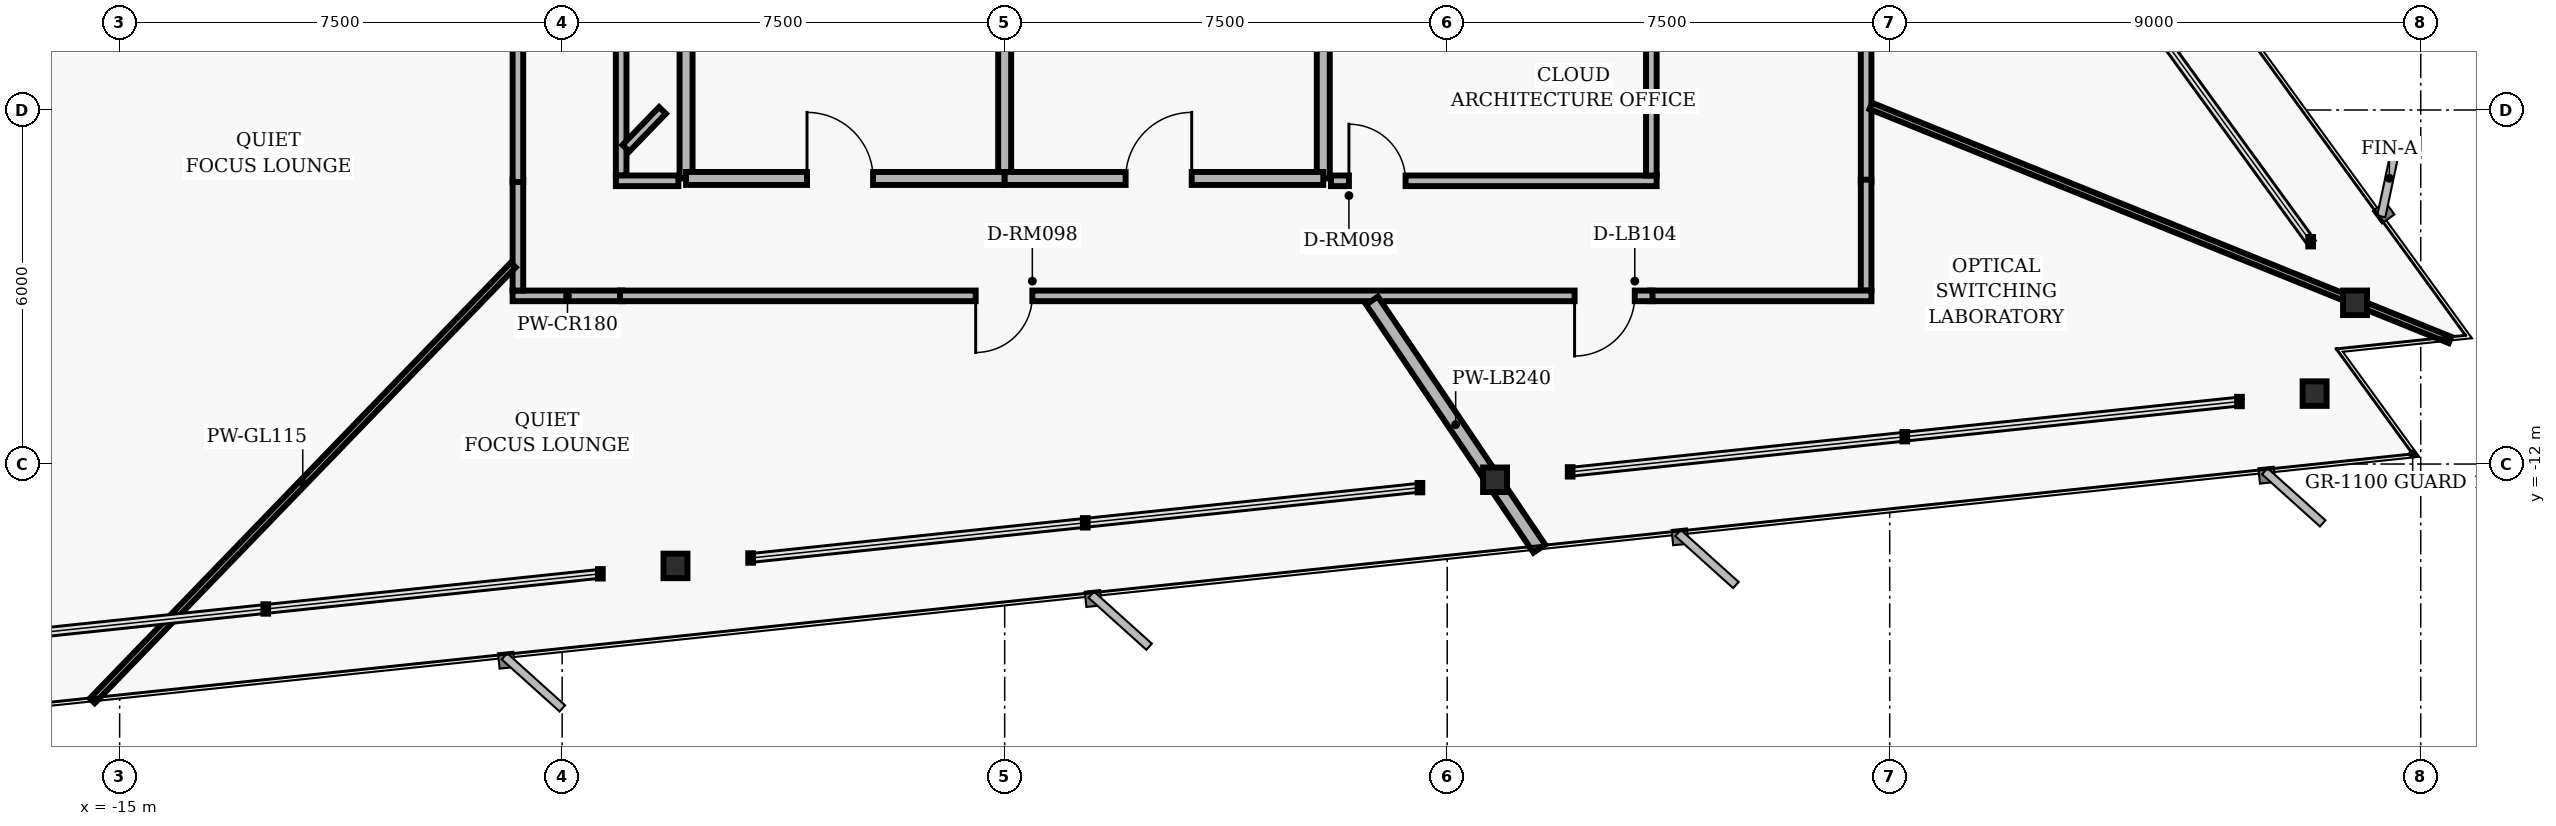
"""IFC4 building model, lengths in metres.
Left out: names, types, materials, properties, quantities, classifications, styles, units other than length and angle.
Written with IfcOpenShell. Run it as: python <this file> out.ifc"""

import sys

from ifc_helpers import new_model, si_unit, direction, frame, frame_2d, origin, origin_2d, place, context, subcontext, project, spatial, rectangle, i_section, extrude, element, fill, save


model = new_model("IFC4")
c1 = context("Model", 3, precision=1e-05, world=origin(), true_north=direction((0.0, 1.0)))
c2 = subcontext(c1, "Body", "Model", "MODEL_VIEW")
j1 = project(units=[si_unit("LENGTHUNIT", "METRE"), si_unit("PLANEANGLEUNIT", "RADIAN")], contexts=[c1])
p1 = place(None, origin())
s1 = spatial("IfcSite", under=j1, at=p1, CompositionType="ELEMENT")
p2 = place(p1, origin())
s2 = spatial("IfcBuilding", under=s1, at=p2, CompositionType="ELEMENT")
p3 = place(p2, frame((0.0, 0.0, 122.88)))
s3 = spatial("IfcBuildingStorey", under=s2, at=p3, CompositionType="ELEMENT", Elevation=122.88)
for number, where, z_axis, x_axis in (
    (1, (22.887, -9.268, 0.0), (0.0, 0.0, 1.0), (1.0, 0.0, 0.0)),
    (2, (-5.579, -13.727, 0.0), (0.0, 0.0, 1.0), (1.0, 0.0, 0.0)),
    (3, (8.311, -12.267, 0.0), (0.0, 0.0, 1.0), (1.0, 0.0, 0.0)),
    (4, (22.201, -10.807, 0.0), (0.0, 0.0, 1.0), (1.0, 0.0, 0.0)),
):
    element("IfcColumn", number, at=place(p3, frame(where, z_axis=z_axis, x_axis=x_axis)), inside=s3, PredefinedType="COLUMN", context=c2, shape_type="SweptSolid", body=[
        extrude(i_section(OverallWidth=0.406, OverallDepth=0.416, WebThickness=0.03, FlangeThickness=0.048, FilletRadius=0.02, at=origin_2d()), origin(), (0.0, 0.0, 1.0), 3.04),
    ])
for number, where, z_axis, x_axis in (
    (5, (-5.4, -7.16, 0.0), (0.0, 0.0, 1.0), (0.0, 1.0, 0.0)),
    (6, (5.4, -7.16, 0.0), (0.0, 0.0, 1.0), (0.0, 1.0, 0.0)),
):
    element("IfcWall", number, at=place(p3, frame(where, z_axis=z_axis, x_axis=x_axis)), inside=s3, PredefinedType="PARTITIONING", context=c2, shape_type="SweptSolid", body=[
        extrude(rectangle(XDim=2.71, YDim=0.22, at=frame_2d((1.355, 0.0))), origin(), (0.0, 0.0, 1.0), 2.593),
    ])
p4 = place(p3, frame((0.0, -7.16, 0.0), z_axis=(0.0, 0.0, 1.0), x_axis=(0.0, 1.0, 0.0)))
e7 = element("IfcWall", 7, at=p4, inside=s3, PredefinedType="PARTITIONING", context=c2, shape_type="SweptSolid", body=[
    extrude(rectangle(XDim=2.81, YDim=0.22, at=frame_2d((1.405, 0.0))), origin(), (0.0, 0.0, 1.0), 2.593),
])
p5 = place(p3, frame((-5.4, -7.16, 0.0), z_axis=(0.0, 0.0, 1.0), x_axis=(1.0, 0.0, 0.0)))
e8 = element("IfcWall", 8, at=p5, inside=s3, PredefinedType="PARTITIONING", context=c2, shape_type="SweptSolid", body=[
    extrude(rectangle(XDim=5.4, YDim=0.22, at=frame_2d((2.7, 0.0))), origin(), (0.0, 0.0, 1.0), 2.16),
])
p6 = place(p5, frame((2.05, 0.0, 0.0)))
e9 = element("IfcOpeningElement", 9, at=p6, cuts=e8, PredefinedType="OPENING", context=c2, shape_type="SweptSolid", body=[
    extrude(rectangle(XDim=1.12, YDim=2.02, at=frame_2d((0.56, 1.01))), frame((0.0, 0.12, 0.0), z_axis=(0.0, -1.0, 0.0), x_axis=(1.0, 0.0, 0.0)), (0.0, 0.0, 1.0), 0.24),
])
p7 = place(p3, frame((0.0, -7.16, 0.0), z_axis=(0.0, 0.0, 1.0), x_axis=(1.0, 0.0, 0.0)))
e10 = element("IfcWall", 10, at=p7, inside=s3, PredefinedType="PARTITIONING", context=c2, shape_type="SweptSolid", body=[
    extrude(rectangle(XDim=5.4, YDim=0.22, at=frame_2d((2.7, 0.0))), origin(), (0.0, 0.0, 1.0), 2.16),
])
p8 = place(p7, frame((2.05, 0.0, 0.0)))
e11 = element("IfcOpeningElement", 11, at=p8, cuts=e10, PredefinedType="OPENING", context=c2, shape_type="SweptSolid", body=[
    extrude(rectangle(XDim=1.12, YDim=2.02, at=frame_2d((0.56, 1.01))), frame((0.0, 0.12, 0.0), z_axis=(0.0, -1.0, 0.0), x_axis=(1.0, 0.0, 0.0)), (0.0, 0.0, 1.0), 0.24),
])
p9 = place(p3, frame((-6.48, -9.15, 0.0), z_axis=(0.0, 0.0, 1.0), x_axis=(-1.0, 0.0, 0.0)))
e12 = element("IfcWall", 12, at=p9, inside=s3, PredefinedType="PARTITIONING", context=c2, shape_type="SweptSolid", body=[
    extrude(rectangle(XDim=1.86, YDim=0.18, at=frame_2d((0.93, 0.0))), origin(), (0.0, 0.0, 1.0), 2.16),
])
p10 = place(p3, frame((-8.25, -9.06, 0.0), z_axis=(0.0, 0.0, 1.0), x_axis=(0.0, 1.0, 0.0)))
e13 = element("IfcWall", 13, at=p10, inside=s3, PredefinedType="PARTITIONING", context=c2, shape_type="SweptSolid", body=[
    extrude(rectangle(XDim=1.88, YDim=0.18, at=frame_2d((0.94, 0.0))), origin(), (0.0, 0.0, 1.0), 2.593),
])
p11 = place(p3, frame((-8.25, -7.22, 0.0), z_axis=(0.0, 0.0, 1.0), x_axis=(0.0, 1.0, 0.0)))
e14 = element("IfcWall", 14, at=p11, inside=s3, PredefinedType="PARTITIONING", context=c2, shape_type="SweptSolid", body=[
    extrude(rectangle(XDim=14.44, YDim=0.18, at=frame_2d((7.22, 0.0))), origin(), (0.0, 0.0, 1.0), 2.16),
])
p12 = place(p11, frame((4.775, 0.0, 0.0)))
e15 = element("IfcOpeningElement", 15, at=p12, cuts=e14, PredefinedType="OPENING", context=c2, shape_type="SweptSolid", body=[
    extrude(rectangle(XDim=0.96, YDim=2.02, at=frame_2d((0.48, 1.01))), frame((0.0, 0.1, 0.0), z_axis=(0.0, -1.0, 0.0), x_axis=(1.0, 0.0, 0.0)), (0.0, 0.0, 1.0), 0.2),
])
p13 = place(p3, frame((14.6, 3.018, 0.0), z_axis=(0.0, 0.0, 1.0), x_axis=(0.0, -1.0, 0.0)))
e16 = element("IfcWall", 16, at=p13, inside=s3, PredefinedType="PARTITIONING", context=c2, shape_type="SweptSolid", body=[
    extrude(rectangle(XDim=10.238, YDim=0.18, at=frame_2d((5.119, 0.0))), origin(), (0.0, 0.0, 1.0), 2.593),
])
p14 = place(p13, frame((4.124, 0.0, 0.0)))
e17 = element("IfcOpeningElement", 17, at=p14, cuts=e16, PredefinedType="OPENING", context=c2, shape_type="SweptSolid", body=[
    extrude(rectangle(XDim=0.96, YDim=2.02, at=frame_2d((0.48, 1.01))), frame((0.0, 0.1, 0.0), z_axis=(0.0, -1.0, 0.0), x_axis=(1.0, 0.0, 0.0)), (0.0, 0.0, 1.0), 0.2),
])
p15 = place(p3, frame((14.6, -7.18, 0.0), z_axis=(0.0, 0.0, 1.0), x_axis=(0.0, -1.0, 0.0)))
e18 = element("IfcWall", 18, at=p15, inside=s3, PredefinedType="PARTITIONING", context=c2, shape_type="SweptSolid", body=[
    extrude(rectangle(XDim=1.88, YDim=0.18, at=frame_2d((0.94, 0.0))), origin(), (0.0, 0.0, 1.0), 2.593),
])
p16 = place(p3, frame((14.69, -9.15, 0.0), z_axis=(0.0, 0.0, 1.0), x_axis=(-1.0, 0.0, 0.0)))
e19 = element("IfcWall", 19, at=p16, inside=s3, PredefinedType="PARTITIONING", context=c2, shape_type="SweptSolid", body=[
    extrude(rectangle(XDim=3.75, YDim=0.18, at=frame_2d((1.875, 0.0))), origin(), (0.0, 0.0, 1.0), 2.16),
])
p17 = place(p3, frame((10.98, -9.15, 0.0), z_axis=(0.0, 0.0, 1.0), x_axis=(-1.0, 0.0, 0.0)))
e20 = element("IfcWall", 20, at=p17, inside=s3, PredefinedType="PARTITIONING", context=c2, shape_type="SweptSolid", body=[
    extrude(rectangle(XDim=17.5, YDim=0.18, at=frame_2d((8.75, 0.0))), origin(), (0.0, 0.0, 1.0), 2.16),
])
p18 = place(p17, frame((10.511, 0.0, 0.0)))
e21 = element("IfcOpeningElement", 21, at=p18, cuts=e20, PredefinedType="OPENING", context=c2, shape_type="SweptSolid", body=[
    extrude(rectangle(XDim=0.96, YDim=2.02, at=frame_2d((0.48, 1.01))), frame((0.0, 0.1, 0.0), z_axis=(0.0, -1.0, 0.0), x_axis=(1.0, 0.0, 0.0)), (0.0, 0.0, 1.0), 0.2),
])
p19 = place(p17, frame((0.301, 0.0, 0.0)))
e22 = element("IfcOpeningElement", 22, at=p19, cuts=e20, PredefinedType="OPENING", context=c2, shape_type="SweptSolid", body=[
    extrude(rectangle(XDim=1.02, YDim=2.02, at=frame_2d((0.51, 1.01))), frame((0.0, 0.1, 0.0), z_axis=(0.0, -1.0, 0.0), x_axis=(1.0, 0.0, 0.0)), (0.0, 0.0, 1.0), 0.2),
])
p20 = place(p3, frame((5.53, -7.2, 0.0), z_axis=(0.0, 0.0, 1.0), x_axis=(1.0, 0.0, 0.0)))
e23 = element("IfcWall", 23, at=p20, inside=s3, PredefinedType="PARTITIONING", context=c2, shape_type="SweptSolid", body=[
    extrude(rectangle(XDim=5.52, YDim=0.18, at=frame_2d((2.76, 0.0))), origin(), (0.0, 0.0, 1.0), 2.16),
])
p21 = place(p20, frame((0.305, 0.0, 0.0)))
e24 = element("IfcOpeningElement", 24, at=p21, cuts=e23, PredefinedType="OPENING", context=c2, shape_type="SweptSolid", body=[
    extrude(rectangle(XDim=0.96, YDim=2.02, at=frame_2d((0.48, 1.01))), frame((0.0, 0.1, 0.0), z_axis=(0.0, -1.0, 0.0), x_axis=(1.0, 0.0, 0.0)), (0.0, 0.0, 1.0), 0.2),
])
p22 = place(p3, frame((10.96, -7.11, 0.0), z_axis=(0.0, 0.0, 1.0), x_axis=(0.0, 1.0, 0.0)))
e25 = element("IfcWall", 25, at=p22, inside=s3, PredefinedType="PARTITIONING", context=c2, shape_type="SweptSolid", body=[
    extrude(rectangle(XDim=3.271, YDim=0.18, at=frame_2d((1.635, 0.0))), origin(), (0.0, 0.0, 1.0), 2.593),
])
p23 = place(p3, frame((-6.5, -4.88, 0.0), z_axis=(0.0, 0.0, 1.0), x_axis=(0.0, -1.0, 0.0)))
e26 = element("IfcWall", 26, at=p23, inside=s3, PredefinedType="PARTITIONING", context=c2, shape_type="SweptSolid", body=[
    extrude(rectangle(XDim=2.23, YDim=0.18, at=frame_2d((1.115, 0.0))), origin(), (0.0, 0.0, 1.0), 2.593),
])
p24 = place(p3, frame((-6.59, -7.2, 0.0), z_axis=(0.0, 0.0, 1.0), x_axis=(1.0, 0.0, 0.0)))
e27 = element("IfcWall", 27, at=p24, inside=s3, PredefinedType="PARTITIONING", context=c2, shape_type="SweptSolid", body=[
    extrude(rectangle(XDim=1.06, YDim=0.18, at=frame_2d((0.53, 0.0))), origin(), (0.0, 0.0, 1.0), 2.16),
])
p25 = place(p3, frame((-5.8, -6.006, 0.0), z_axis=(0.0, 0.0, 1.0), x_axis=(-0.694550575615, -0.719443881003, 0.0)))
e28 = element("IfcWall", 28, at=p25, inside=s3, PredefinedType="PARTITIONING", context=c2, shape_type="SweptSolid", body=[
    extrude(rectangle(XDim=0.893, YDim=0.16, at=frame_2d((0.446, 0.0))), origin(), (0.0, 0.0, 1.0), 2.593),
])
p26 = place(p3, frame((-8.33, -8.626, 0.0), z_axis=(0.0, 0.0, 1.0), x_axis=(-0.694659007852, -0.719339184815, 0.0)))
e29 = element("IfcWall", 29, at=p26, inside=s3, PredefinedType="MOVABLE", context=c2, shape_type="SweptSolid", body=[
    extrude(rectangle(XDim=10.268, YDim=0.115, at=frame_2d((5.134, 0.0))), origin(), (0.0, 0.0, 1.0), 2.593),
])
p27 = place(p3, frame((6.226, -9.23, 0.0), z_axis=(0.0, 0.0, 1.0), x_axis=(0.559190912305, -0.82903891561, 0.0)))
e30 = element("IfcWall", 30, at=p27, inside=s3, PredefinedType="PARTITIONING", context=c2, shape_type="SweptSolid", body=[
    extrude(rectangle(XDim=5.072, YDim=0.24, at=frame_2d((2.536, 0.0))), origin(), (0.0, 0.0, 1.0), 2.593),
])
p28 = place(p3, frame((14.68, -5.931, 0.0), z_axis=(0.0, 0.0, 1.0), x_axis=(0.927187622353, -0.374597267682, 0.0)))
e31 = element("IfcWall", 31, at=p28, inside=s3, PredefinedType="MOVABLE", context=c2, shape_type="SweptSolid", body=[
    extrude(rectangle(XDim=10.586, YDim=0.115, at=frame_2d((5.293, 0.0))), origin(), (0.0, 0.0, 1.0), 1.962),
])
p29 = place(p6, origin())
e32 = element("IfcDoor", 32, at=p29, inside=s3, OperationType="SINGLE_SWING_LEFT", PredefinedType="DOOR", context=c2, shape_type="SweptSolid", body=[
    extrude(rectangle(XDim=1.12, YDim=2.02, at=frame_2d((0.56, 1.01))), frame((0.0, 0.025, 0.0), z_axis=(0.0, -1.0, 0.0), x_axis=(1.0, 0.0, 0.0)), (0.0, 0.0, 1.0), 0.05),
])
fill(e9, e32)
p30 = place(p8, origin())
e33 = element("IfcDoor", 33, at=p30, inside=s3, OperationType="SINGLE_SWING_RIGHT", PredefinedType="DOOR", context=c2, shape_type="SweptSolid", body=[
    extrude(rectangle(XDim=1.12, YDim=2.02, at=frame_2d((0.56, 1.01))), frame((0.0, 0.025, 0.0), z_axis=(0.0, -1.0, 0.0), x_axis=(1.0, 0.0, 0.0)), (0.0, 0.0, 1.0), 0.05),
])
fill(e11, e33)
p31 = place(p18, origin())
e34 = element("IfcDoor", 34, at=p31, inside=s3, OperationType="SINGLE_SWING_RIGHT", PredefinedType="DOOR", context=c2, shape_type="SweptSolid", body=[
    extrude(rectangle(XDim=0.96, YDim=2.02, at=frame_2d((0.48, 1.01))), frame((0.0, 0.025, 0.0), z_axis=(0.0, -1.0, 0.0), x_axis=(1.0, 0.0, 0.0)), (0.0, 0.0, 1.0), 0.05),
])
fill(e21, e34)
p32 = place(p21, origin())
e35 = element("IfcDoor", 35, at=p32, inside=s3, OperationType="SINGLE_SWING_LEFT", PredefinedType="DOOR", context=c2, shape_type="SweptSolid", body=[
    extrude(rectangle(XDim=0.96, YDim=2.02, at=frame_2d((0.48, 1.01))), frame((0.0, 0.025, 0.0), z_axis=(0.0, -1.0, 0.0), x_axis=(1.0, 0.0, 0.0)), (0.0, 0.0, 1.0), 0.05),
])
fill(e24, e35)
p33 = place(p19, origin())
e36 = element("IfcDoor", 36, at=p33, inside=s3, OperationType="SINGLE_SWING_RIGHT", PredefinedType="DOOR", context=c2, shape_type="SweptSolid", body=[
    extrude(rectangle(XDim=1.02, YDim=2.02, at=frame_2d((0.51, 1.01))), frame((0.0, 0.025, 0.0), z_axis=(0.0, -1.0, 0.0), x_axis=(1.0, 0.0, 0.0)), (0.0, 0.0, 1.0), 0.05),
])
fill(e22, e36)
save(model, sys.argv[1])
